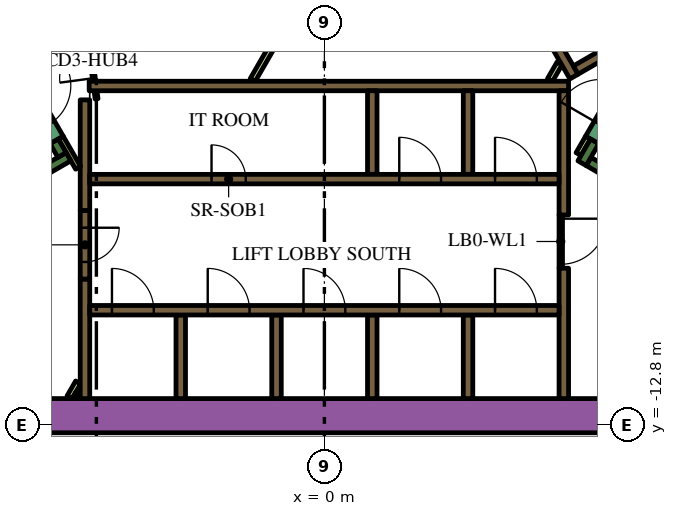
"""IFC4 building model, lengths in metres.
Left out: names, types, materials, properties, quantities, classifications, styles, units other than length and angle.
Written with IfcOpenShell. Run it as: python <this file> out.ifc"""

import sys

from ifc_helpers import new_model, si_unit, direction, frame, frame_2d, origin, place, context, subcontext, project, spatial, polyline, rectangle, outline, extrude, element, fill, save


model = new_model("IFC4")
c1 = context("Model", 3, precision=1e-05, world=origin(), true_north=direction((0.0, 1.0)))
c2 = subcontext(c1, "Body", "Model", "MODEL_VIEW")
j1 = project(units=[si_unit("LENGTHUNIT", "METRE"), si_unit("PLANEANGLEUNIT", "RADIAN")], contexts=[c1])
p1 = place(None, origin())
s1 = spatial("IfcSite", under=j1, at=p1, CompositionType="ELEMENT")
p2 = place(p1, origin())
s2 = spatial("IfcBuilding", under=s1, at=p2, CompositionType="ELEMENT")
p3 = place(p2, frame((0.0, 0.0, 130.5)))
s3 = spatial("IfcBuildingStorey", under=s2, at=p3, CompositionType="ELEMENT", Elevation=130.5)
p4 = place(p3, frame((6.776, 13.364, 0.0), z_axis=(0.0, 0.0, 1.0), x_axis=(0.500004177138, -0.8660229921, 0.0)))
e1 = element("IfcWall", 1, at=p4, inside=s3, PredefinedType="SOLIDWALL", context=c2, shape_type="SweptSolid", body=[
    extrude(rectangle(XDim=20.204, YDim=0.9, at=frame_2d((10.102, 0.0))), origin(), (0.0, 0.0, 1.0), 3.9),
])
p5 = place(p3, frame((-12.019, -12.55, 0.0), z_axis=(0.0, 0.0, 1.0), x_axis=(1.0, 0.0, 0.0)))
e2 = element("IfcWall", 2, at=p5, inside=s3, PredefinedType="SOLIDWALL", context=c2, shape_type="SweptSolid", body=[
    extrude(rectangle(XDim=21.63, YDim=0.9, at=frame_2d((10.815, 0.0))), origin(), (0.0, 0.0, 1.0), 3.9),
])
p6 = place(p3, frame((12.84, -9.261, 0.0), z_axis=(0.0, 0.0, 1.0), x_axis=(-0.866013990052, 0.500019768644, 0.0)))
e3 = element("IfcWall", 3, at=p6, inside=s3, PredefinedType="SOLIDWALL", context=c2, shape_type="SweptSolid", body=[
    extrude(rectangle(XDim=6.8, YDim=0.25, at=frame_2d((3.4, 0.0))), origin(), (0.0, 0.0, 1.0), 3.9),
])
p7 = place(p3, frame((7.113, -5.33, 0.0), z_axis=(0.0, 0.0, 1.0), x_axis=(-0.499965889992, -0.866045096311, 0.0)))
e4 = element("IfcWall", 4, at=p7, inside=s3, PredefinedType="SOLIDWALL", context=c2, shape_type="SweptSolid", body=[
    extrude(rectangle(XDim=0.666, YDim=0.25, at=frame_2d((0.333, 0.0))), origin(), (0.0, 0.0, 1.0), 3.9),
])
p8 = place(p3, frame((-12.84, -9.261, 0.0), z_axis=(0.0, 0.0, 1.0), x_axis=(0.866016039709, 0.500016218704, 0.0)))
e5 = element("IfcWall", 5, at=p8, inside=s3, PredefinedType="SOLIDWALL", context=c2, shape_type="SweptSolid", body=[
    extrude(rectangle(XDim=7.05, YDim=0.25, at=frame_2d((3.525, 0.0))), origin(), (0.0, 0.0, 1.0), 3.9),
])
p9 = place(p3, frame((-6.905, -5.69, 0.0), z_axis=(0.0, 0.0, 1.0), x_axis=(-0.499993700073, 0.866029041019, 0.0)))
e6 = element("IfcWall", 6, at=p9, inside=s3, PredefinedType="SOLIDWALL", context=c2, shape_type="SweptSolid", body=[
    extrude(rectangle(XDim=0.416, YDim=0.25, at=frame_2d((0.208, 0.0))), origin(), (0.0, 0.0, 1.0), 3.9),
])
p10 = place(p3, frame((-3.78, -12.1, 0.0), z_axis=(0.0, 0.0, 1.0), x_axis=(0.0, 1.0, 0.0)))
e7 = element("IfcWall", 7, at=p10, inside=s3, PredefinedType="SOLIDWALL", context=c2, shape_type="SweptSolid", body=[
    extrude(rectangle(XDim=2.2, YDim=0.25, at=frame_2d((1.1, 0.0))), origin(), (0.0, 0.0, 1.0), 3.9),
])
p11 = place(p3, frame((-6.3, -12.1, 0.0), z_axis=(0.0, 0.0, 1.0), x_axis=(0.0, 1.0, 0.0)))
e8 = element("IfcWall", 8, at=p11, inside=s3, PredefinedType="SOLIDWALL", context=c2, shape_type="SweptSolid", body=[
    extrude(rectangle(XDim=3.146, YDim=0.25, at=frame_2d((1.573, 0.0))), origin(), (0.0, 0.0, 1.0), 3.9),
])
p12 = place(p3, frame((-6.3, -4.24, 0.0), z_axis=(0.0, 0.0, 1.0), x_axis=(0.0, -1.0, 0.0)))
e9 = element("IfcWall", 9, at=p12, inside=s3, PredefinedType="SOLIDWALL", context=c2, shape_type="SweptSolid", body=[
    extrude(rectangle(XDim=2.914, YDim=0.25, at=frame_2d((1.457, 0.0))), origin(), (0.0, 0.0, 1.0), 3.9),
])
p13 = place(p3, frame((-6.19, -3.875, 0.0), z_axis=(0.0, 0.0, 1.0), x_axis=(1.0, 0.0, 0.0)))
e10 = element("IfcWall", 10, at=p13, inside=s3, PredefinedType="SOLIDWALL", context=c2, shape_type="SweptSolid", body=[
    extrude(rectangle(XDim=12.615, YDim=0.25, at=frame_2d((6.307, 0.0))), origin(), (0.0, 0.0, 1.0), 3.9),
])
p14 = place(p3, frame((6.3, -8.67, 0.0), z_axis=(0.0, 0.0, 1.0), x_axis=(0.0, -1.0, 0.0)))
e11 = element("IfcWall", 11, at=p14, inside=s3, PredefinedType="SOLIDWALL", context=c2, shape_type="SweptSolid", body=[
    extrude(rectangle(XDim=3.43, YDim=0.25, at=frame_2d((1.715, 0.0))), origin(), (0.0, 0.0, 1.0), 3.9),
])
p15 = place(p3, frame((6.3, -7.268, 0.0), z_axis=(0.0, 0.0, 1.0), x_axis=(0.0, 1.0, 0.0)))
e12 = element("IfcWall", 12, at=p15, inside=s3, PredefinedType="SOLIDWALL", context=c2, shape_type="SweptSolid", body=[
    extrude(rectangle(XDim=3.268, YDim=0.25, at=frame_2d((1.634, 0.0))), origin(), (0.0, 0.0, 1.0), 3.9),
])
for number, where, z_axis, x_axis in (
    (13, (3.78, -4.0, 0.0), (0.0, 0.0, 1.0), (0.0, -1.0, 0.0)),
    (14, (1.26, -4.0, 0.0), (0.0, 0.0, 1.0), (0.0, -1.0, 0.0)),
    (15, (3.78, -12.1, 0.0), (0.0, 0.0, 1.0), (0.0, 1.0, 0.0)),
    (16, (1.26, -12.1, 0.0), (0.0, 0.0, 1.0), (0.0, 1.0, 0.0)),
    (17, (-1.26, -12.1, 0.0), (0.0, 0.0, 1.0), (0.0, 1.0, 0.0)),
):
    element("IfcWall", number, at=place(p3, frame(where, z_axis=z_axis, x_axis=x_axis)), inside=s3, PredefinedType="SOLIDWALL", context=c2, shape_type="SweptSolid", body=[
        extrude(rectangle(XDim=2.2, YDim=0.25, at=frame_2d((1.1, 0.0))), origin(), (0.0, 0.0, 1.0), 3.9),
    ])
p16 = place(p3, origin())
e18 = element("IfcWall", 18, at=p16, inside=s3, PredefinedType="SOLIDWALL", context=c2, shape_type="SweptSolid", body=[
    extrude(outline(polyline([(0.335, 6.925), (0.335, 7.075), (0.335, 7.075), (0.335, 7.075), (0.245, 7.075), (0.035, 7.439), (0.252, 7.564), (0.377, 7.348), (1.512, 5.382), (1.637, 5.165), (2.221, 4.153), (2.771, 3.199), (2.896, 2.983), (3.138, 2.564), (4.031, 1.017), (4.156, 0.801), (5.292, -1.165), (5.417, -1.382), (6.073, -2.519), (6.552, -3.348), (6.677, -3.564), (6.46, -3.689), (0.332, 6.925), (0.335, 6.925), (0.335, 6.925), (0.335, 6.925)])), origin(), (0.0, 0.0, 1.0), 3.9),
])
p17 = place(p3, frame((9.352, -1.875, 0.0), z_axis=(0.0, 0.0, 1.0), x_axis=(-0.866024844342, -0.500000968981, 0.0)))
e19 = element("IfcWall", 19, at=p17, inside=s3, PredefinedType="SOLIDWALL", context=c2, shape_type="SweptSolid", body=[
    extrude(rectangle(XDim=3.162, YDim=0.25, at=frame_2d((1.581, 0.0))), origin(), (0.0, 0.0, 1.0), 3.9),
])
p18 = place(p3, frame((-6.708, -12.068, 0.0), z_axis=(0.0, 0.0, 1.0), x_axis=(0.500000789788, 0.8660249478, 0.0)))
e20 = element("IfcWall", 20, at=p18, inside=s3, PredefinedType="PARTITIONING", context=c2, shape_type="SweptSolid", body=[
    extrude(rectangle(XDim=0.456, YDim=0.15, at=frame_2d((0.228, 0.0))), origin(), (0.0, 0.0, 1.0), 2.6),
])
p19 = place(p3, frame((-6.534, -12.068, 0.0), z_axis=(0.0, 0.0, 1.0), x_axis=(0.500240224089, 0.865886665912, 0.0)))
e21 = element("IfcWall", 21, at=p19, inside=s3, PredefinedType="PARTITIONING", context=c2, shape_type="SweptSolid", body=[
    extrude(rectangle(XDim=0.109, YDim=0.15, at=frame_2d((0.054, 0.0))), origin(), (0.0, 0.0, 1.0), 2.6),
])
p20 = place(p3, frame((-6.48, -6.027, 0.0), z_axis=(0.0, 0.0, 1.0), x_axis=(-0.499936960004, 0.866061796884, 0.0)))
e22 = element("IfcWall", 22, at=p20, inside=s3, PredefinedType="PARTITIONING", context=c2, shape_type="SweptSolid", body=[
    extrude(rectangle(XDim=0.919, YDim=0.15, at=frame_2d((0.46, 0.0))), origin(), (0.0, 0.0, 1.0), 3.9),
])
p21 = place(p3, frame((-1.887, -3.718, 0.0), z_axis=(0.0, 0.0, 1.0), x_axis=(0.499842898591, 0.866116087328, 0.0)))
e23 = element("IfcWall", 23, at=p21, inside=s3, PredefinedType="PARTITIONING", context=c2, shape_type="SweptSolid", body=[
    extrude(rectangle(XDim=0.936, YDim=0.15, at=frame_2d((0.468, 0.0))), origin(), (0.0, 0.0, 1.0), 2.6),
])
p22 = place(p3, frame((6.688, -5.667, 0.0), z_axis=(0.0, 0.0, 1.0), x_axis=(0.499834152157, 0.86612113491, 0.0)))
e24 = element("IfcWall", 24, at=p22, inside=s3, PredefinedType="PARTITIONING", context=c2, shape_type="SweptSolid", body=[
    extrude(rectangle(XDim=0.505, YDim=0.15, at=frame_2d((0.252, 0.0))), origin(), (0.0, 0.0, 1.0), 2.6),
])
p23 = place(p3, frame((5.936, -3.718, 0.0), z_axis=(0.0, 0.0, 1.0), x_axis=(0.499890179513, 0.866088799389, 0.0)))
e25 = element("IfcWall", 25, at=p23, inside=s3, PredefinedType="PARTITIONING", context=c2, shape_type="SweptSolid", body=[
    extrude(rectangle(XDim=0.504, YDim=0.15, at=frame_2d((0.252, 0.0))), origin(), (0.0, 0.0, 1.0), 2.6),
])
p24 = place(p3, frame((-6.175, -9.775, 0.0), z_axis=(0.0, 0.0, 1.0), x_axis=(1.0, 0.0, 0.0)))
e26 = element("IfcWall", 26, at=p24, inside=s3, PredefinedType="SOLIDWALL", context=c2, shape_type="SweptSolid", body=[
    extrude(rectangle(XDim=12.35, YDim=0.25, at=frame_2d((6.175, 0.0))), origin(), (0.0, 0.0, 1.0), 3.9),
])
p25 = place(p24, frame((0.585, 0.0, 0.0)))
e27 = element("IfcOpeningElement", 27, at=p25, cuts=e26, PredefinedType="OPENING", context=c2, shape_type="SweptSolid", body=[
    extrude(rectangle(XDim=1.1, YDim=2.1, at=frame_2d((0.55, 1.05))), frame((0.0, 0.135, 0.0), z_axis=(0.0, -1.0, 0.0), x_axis=(1.0, 0.0, 0.0)), (0.0, 0.0, 1.0), 0.27),
])
p26 = place(p24, frame((3.105, 0.0, 0.0)))
e28 = element("IfcOpeningElement", 28, at=p26, cuts=e26, PredefinedType="OPENING", context=c2, shape_type="SweptSolid", body=[
    extrude(rectangle(XDim=1.1, YDim=2.1, at=frame_2d((0.55, 1.05))), frame((0.0, 0.135, 0.0), z_axis=(0.0, -1.0, 0.0), x_axis=(1.0, 0.0, 0.0)), (0.0, 0.0, 1.0), 0.27),
])
p27 = place(p24, frame((5.625, 0.0, 0.0)))
e29 = element("IfcOpeningElement", 29, at=p27, cuts=e26, PredefinedType="OPENING", context=c2, shape_type="SweptSolid", body=[
    extrude(rectangle(XDim=1.1, YDim=2.1, at=frame_2d((0.55, 1.05))), frame((0.0, 0.135, 0.0), z_axis=(0.0, -1.0, 0.0), x_axis=(1.0, 0.0, 0.0)), (0.0, 0.0, 1.0), 0.27),
])
p28 = place(p24, frame((8.145, 0.0, 0.0)))
e30 = element("IfcOpeningElement", 30, at=p28, cuts=e26, PredefinedType="OPENING", context=c2, shape_type="SweptSolid", body=[
    extrude(rectangle(XDim=1.1, YDim=2.1, at=frame_2d((0.55, 1.05))), frame((0.0, 0.135, 0.0), z_axis=(0.0, -1.0, 0.0), x_axis=(1.0, 0.0, 0.0)), (0.0, 0.0, 1.0), 0.27),
])
p29 = place(p24, frame((10.665, 0.0, 0.0)))
e31 = element("IfcOpeningElement", 31, at=p29, cuts=e26, PredefinedType="OPENING", context=c2, shape_type="SweptSolid", body=[
    extrude(rectangle(XDim=1.1, YDim=2.1, at=frame_2d((0.55, 1.05))), frame((0.0, 0.135, 0.0), z_axis=(0.0, -1.0, 0.0), x_axis=(1.0, 0.0, 0.0)), (0.0, 0.0, 1.0), 0.27),
])
p30 = place(p3, frame((-6.175, -6.325, 0.0), z_axis=(0.0, 0.0, 1.0), x_axis=(1.0, 0.0, 0.0)))
e32 = element("IfcWall", 32, at=p30, inside=s3, PredefinedType="SOLIDWALL", context=c2, shape_type="SweptSolid", body=[
    extrude(rectangle(XDim=12.35, YDim=0.25, at=frame_2d((6.175, 0.0))), origin(), (0.0, 0.0, 1.0), 3.9),
])
p31 = place(p30, frame((3.205, 0.0, 0.0)))
e33 = element("IfcOpeningElement", 33, at=p31, cuts=e32, PredefinedType="OPENING", context=c2, shape_type="SweptSolid", body=[
    extrude(rectangle(XDim=0.9, YDim=2.1, at=frame_2d((0.45, 1.05))), frame((0.0, 0.135, 0.0), z_axis=(0.0, -1.0, 0.0), x_axis=(1.0, 0.0, 0.0)), (0.0, 0.0, 1.0), 0.27),
])
p32 = place(p30, frame((8.145, 0.0, 0.0)))
e34 = element("IfcOpeningElement", 34, at=p32, cuts=e32, PredefinedType="OPENING", context=c2, shape_type="SweptSolid", body=[
    extrude(rectangle(XDim=1.1, YDim=2.1, at=frame_2d((0.55, 1.05))), frame((0.0, 0.135, 0.0), z_axis=(0.0, -1.0, 0.0), x_axis=(1.0, 0.0, 0.0)), (0.0, 0.0, 1.0), 0.27),
])
p33 = place(p30, frame((10.665, 0.0, 0.0)))
e35 = element("IfcOpeningElement", 35, at=p33, cuts=e32, PredefinedType="OPENING", context=c2, shape_type="SweptSolid", body=[
    extrude(rectangle(XDim=1.1, YDim=2.1, at=frame_2d((0.55, 1.05))), frame((0.0, 0.135, 0.0), z_axis=(0.0, -1.0, 0.0), x_axis=(1.0, 0.0, 0.0)), (0.0, 0.0, 1.0), 0.27),
])
p34 = place(p3, frame((7.048, -5.292, 0.0), z_axis=(0.0, 0.0, 1.0), x_axis=(0.49994051562, 0.866059744384, 0.0)))
e36 = element("IfcWall", 36, at=p34, inside=s3, PredefinedType="SOLIDWALL", context=c2, shape_type="SweptSolid", body=[
    extrude(rectangle(XDim=2.1, YDim=0.4, at=frame_2d((1.05, 0.0))), origin(), (0.0, 0.0, 1.0), 3.9),
])
p35 = place(p34, frame((0.45, 0.0, 0.0)))
e37 = element("IfcOpeningElement", 37, at=p35, cuts=e36, PredefinedType="OPENING", context=c2, shape_type="SweptSolid", body=[
    extrude(rectangle(XDim=1.2, YDim=2.1, at=frame_2d((0.6, 1.05))), frame((0.0, 0.21, 0.0), z_axis=(0.0, -1.0, 0.0), x_axis=(1.0, 0.0, 0.0)), (0.0, 0.0, 1.0), 0.42),
])
p36 = place(p3, frame((-8.098, -3.474, 0.0), z_axis=(0.0, 0.0, 1.0), x_axis=(0.49994051562, -0.866059744384, 0.0)))
e38 = element("IfcWall", 38, at=p36, inside=s3, PredefinedType="SOLIDWALL", context=c2, shape_type="SweptSolid", body=[
    extrude(rectangle(XDim=2.1, YDim=0.4, at=frame_2d((1.05, 0.0))), origin(), (0.0, 0.0, 1.0), 3.9),
])
p37 = place(p36, frame((0.45, 0.0, 0.0)))
e39 = element("IfcOpeningElement", 39, at=p37, cuts=e38, PredefinedType="OPENING", context=c2, shape_type="SweptSolid", body=[
    extrude(rectangle(XDim=1.2, YDim=2.1, at=frame_2d((0.6, 1.05))), frame((0.0, 0.21, 0.0), z_axis=(0.0, -1.0, 0.0), x_axis=(1.0, 0.0, 0.0)), (0.0, 0.0, 1.0), 0.42),
])
p38 = place(p3, frame((-6.3, -7.154, 0.0), z_axis=(0.0, 0.0, 1.0), x_axis=(0.0, -1.0, 0.0)))
e40 = element("IfcWall", 40, at=p38, inside=s3, PredefinedType="SOLIDWALL", context=c2, shape_type="SweptSolid", body=[
    extrude(rectangle(XDim=1.8, YDim=0.25, at=frame_2d((0.9, 0.0))), origin(), (0.0, 0.0, 1.0), 3.9),
])
p39 = place(p38, frame((0.45, 0.0, 0.0)))
e41 = element("IfcOpeningElement", 41, at=p39, cuts=e40, PredefinedType="OPENING", context=c2, shape_type="SweptSolid", body=[
    extrude(rectangle(XDim=0.9, YDim=2.1, at=frame_2d((0.45, 1.05))), frame((0.0, 0.135, 0.0), z_axis=(0.0, -1.0, 0.0), x_axis=(1.0, 0.0, 0.0)), (0.0, 0.0, 1.0), 0.27),
])
p40 = place(p3, frame((-5.995, -4.213, 0.0), z_axis=(0.0, 0.0, 1.0), x_axis=(-0.132072335448, 0.991240081014, 0.0)))
e42 = element("IfcWall", 42, at=p40, inside=s3, PredefinedType="PARTITIONING", context=c2, shape_type="SweptSolid", body=[
    extrude(rectangle(XDim=2.1, YDim=0.076, at=frame_2d((1.05, 0.0))), origin(), (0.0, 0.0, 1.0), 2.6),
])
p41 = place(p40, frame((0.55, 0.0, 0.0)))
e43 = element("IfcOpeningElement", 43, at=p41, cuts=e42, PredefinedType="OPENING", context=c2, shape_type="SweptSolid", body=[
    extrude(rectangle(XDim=0.9, YDim=2.1, at=frame_2d((0.45, 1.05))), frame((0.0, 0.048, 0.0), z_axis=(0.0, -1.0, 0.0), x_axis=(1.0, 0.0, 0.0)), (0.0, 0.0, 1.0), 0.096),
])
p42 = place(p3, frame((6.22, -7.266, 0.0), z_axis=(0.0, 0.0, 1.0), x_axis=(0.0, -1.0, 0.0)))
e44 = element("IfcWall", 44, at=p42, inside=s3, PredefinedType="PARTITIONING", context=c2, shape_type="SweptSolid", body=[
    extrude(rectangle(XDim=1.4, YDim=0.09, at=frame_2d((0.7, 0.0))), origin(), (0.0, 0.0, 1.0), 2.6),
])
p43 = place(p42, frame((0.1, 0.0, 0.0)))
e45 = element("IfcOpeningElement", 45, at=p43, cuts=e44, PredefinedType="OPENING", context=c2, shape_type="SweptSolid", body=[
    extrude(rectangle(XDim=1.2, YDim=2.1, at=frame_2d((0.6, 1.05))), frame((0.0, 0.055, 0.0), z_axis=(0.0, -1.0, 0.0), x_axis=(1.0, 0.0, 0.0)), (0.0, 0.0, 1.0), 0.11),
])
p44 = place(p3, frame((6.163, 18.475, 0.0), z_axis=(0.0, 0.0, 1.0), x_axis=(0.500001317485, -0.866024643133, 0.0)))
e46 = element("IfcWall", 46, at=p44, inside=s3, PredefinedType="PARTITIONING", context=c2, shape_type="SweptSolid", body=[
    extrude(rectangle(XDim=25.767, YDim=0.15, at=frame_2d((12.883, 0.0))), origin(), (0.0, 0.0, 1.0), 2.6),
])
p45 = place(p44, frame((21.774, 0.0, 0.0)))
e47 = element("IfcOpeningElement", 47, at=p45, cuts=e46, PredefinedType="OPENING", context=c2, shape_type="SweptSolid", body=[
    extrude(rectangle(XDim=1.0, YDim=2.1, at=frame_2d((0.5, 1.05))), frame((0.0, 0.085, 0.0), z_axis=(0.0, -1.0, 0.0), x_axis=(1.0, 0.0, 0.0)), (0.0, 0.0, 1.0), 0.17),
])
p46 = place(p44, frame((15.571, 0.0, 0.0)))
e48 = element("IfcOpeningElement", 48, at=p46, cuts=e46, PredefinedType="OPENING", context=c2, shape_type="SweptSolid", body=[
    extrude(rectangle(XDim=1.0, YDim=2.1, at=frame_2d((0.5, 1.05))), frame((0.0, 0.085, 0.0), z_axis=(0.0, -1.0, 0.0), x_axis=(1.0, 0.0, 0.0)), (0.0, 0.0, 1.0), 0.17),
])
p47 = place(p44, frame((9.265, 0.0, 0.0)))
e49 = element("IfcOpeningElement", 49, at=p47, cuts=e46, PredefinedType="OPENING", context=c2, shape_type="SweptSolid", body=[
    extrude(rectangle(XDim=1.0, YDim=2.1, at=frame_2d((0.5, 1.05))), frame((0.0, 0.085, 0.0), z_axis=(0.0, -1.0, 0.0), x_axis=(1.0, 0.0, 0.0)), (0.0, 0.0, 1.0), 0.17),
])
p48 = place(p44, frame((3.063, 0.0, 0.0)))
e50 = element("IfcOpeningElement", 50, at=p48, cuts=e46, PredefinedType="OPENING", context=c2, shape_type="SweptSolid", body=[
    extrude(rectangle(XDim=1.0, YDim=2.1, at=frame_2d((0.5, 1.05))), frame((0.0, 0.085, 0.0), z_axis=(0.0, -1.0, 0.0), x_axis=(1.0, 0.0, 0.0)), (0.0, 0.0, 1.0), 0.17),
])
p49 = place(p3, frame((-19.081, -3.9, 0.0), z_axis=(0.0, 0.0, 1.0), x_axis=(0.499998313975, 0.866026377209, 0.0)))
e51 = element("IfcWall", 51, at=p49, inside=s3, PredefinedType="PARTITIONING", context=c2, shape_type="SweptSolid", body=[
    extrude(rectangle(XDim=25.766, YDim=0.15, at=frame_2d((12.883, 0.0))), origin(), (0.0, 0.0, 1.0), 2.6),
])
p50 = place(p49, frame((24.141, 0.0, 0.0)))
e52 = element("IfcOpeningElement", 52, at=p50, cuts=e51, PredefinedType="OPENING", context=c2, shape_type="SweptSolid", body=[
    extrude(rectangle(XDim=1.1, YDim=2.1, at=frame_2d((0.55, 1.05))), frame((0.0, 0.085, 0.0), z_axis=(0.0, -1.0, 0.0), x_axis=(1.0, 0.0, 0.0)), (0.0, 0.0, 1.0), 0.17),
])
p51 = place(p49, frame((13.144, 0.0, 0.0)))
e53 = element("IfcOpeningElement", 53, at=p51, cuts=e51, PredefinedType="OPENING", context=c2, shape_type="SweptSolid", body=[
    extrude(rectangle(XDim=1.0, YDim=2.1, at=frame_2d((0.5, 1.05))), frame((0.0, 0.085, 0.0), z_axis=(0.0, -1.0, 0.0), x_axis=(1.0, 0.0, 0.0)), (0.0, 0.0, 1.0), 0.17),
])
p52 = place(p49, frame((11.593, 0.0, 0.0)))
e54 = element("IfcOpeningElement", 54, at=p52, cuts=e51, PredefinedType="OPENING", context=c2, shape_type="SweptSolid", body=[
    extrude(rectangle(XDim=1.1, YDim=2.1, at=frame_2d((0.55, 1.05))), frame((0.0, 0.085, 0.0), z_axis=(0.0, -1.0, 0.0), x_axis=(1.0, 0.0, 0.0)), (0.0, 0.0, 1.0), 0.17),
])
p53 = place(p49, frame((0.596, 0.0, 0.0)))
e55 = element("IfcOpeningElement", 55, at=p53, cuts=e51, PredefinedType="OPENING", context=c2, shape_type="SweptSolid", body=[
    extrude(rectangle(XDim=1.0, YDim=2.1, at=frame_2d((0.5, 1.05))), frame((0.0, 0.085, 0.0), z_axis=(0.0, -1.0, 0.0), x_axis=(1.0, 0.0, 0.0)), (0.0, 0.0, 1.0), 0.17),
])
p54 = place(p25, origin())
e56 = element("IfcDoor", 56, at=p54, inside=s3, OperationType="DOUBLE_DOOR_SLIDING", PredefinedType="DOOR", context=c2, shape_type="SweptSolid", body=[
    extrude(rectangle(XDim=1.1, YDim=2.1, at=frame_2d((0.55, 1.05))), frame((0.0, 0.025, 0.0), z_axis=(0.0, -1.0, 0.0), x_axis=(1.0, 0.0, 0.0)), (0.0, 0.0, 1.0), 0.05),
])
fill(e27, e56)
p55 = place(p26, origin())
e57 = element("IfcDoor", 57, at=p55, inside=s3, OperationType="DOUBLE_DOOR_SLIDING", PredefinedType="DOOR", context=c2, shape_type="SweptSolid", body=[
    extrude(rectangle(XDim=1.1, YDim=2.1, at=frame_2d((0.55, 1.05))), frame((0.0, 0.025, 0.0), z_axis=(0.0, -1.0, 0.0), x_axis=(1.0, 0.0, 0.0)), (0.0, 0.0, 1.0), 0.05),
])
fill(e28, e57)
p56 = place(p27, origin())
e58 = element("IfcDoor", 58, at=p56, inside=s3, OperationType="DOUBLE_DOOR_SLIDING", PredefinedType="DOOR", context=c2, shape_type="SweptSolid", body=[
    extrude(rectangle(XDim=1.1, YDim=2.1, at=frame_2d((0.55, 1.05))), frame((0.0, 0.025, 0.0), z_axis=(0.0, -1.0, 0.0), x_axis=(1.0, 0.0, 0.0)), (0.0, 0.0, 1.0), 0.05),
])
fill(e29, e58)
p57 = place(p28, origin())
e59 = element("IfcDoor", 59, at=p57, inside=s3, OperationType="DOUBLE_DOOR_SLIDING", PredefinedType="DOOR", context=c2, shape_type="SweptSolid", body=[
    extrude(rectangle(XDim=1.1, YDim=2.1, at=frame_2d((0.55, 1.05))), frame((0.0, 0.025, 0.0), z_axis=(0.0, -1.0, 0.0), x_axis=(1.0, 0.0, 0.0)), (0.0, 0.0, 1.0), 0.05),
])
fill(e30, e59)
p58 = place(p29, origin())
e60 = element("IfcDoor", 60, at=p58, inside=s3, OperationType="DOUBLE_DOOR_SLIDING", PredefinedType="DOOR", context=c2, shape_type="SweptSolid", body=[
    extrude(rectangle(XDim=1.1, YDim=2.1, at=frame_2d((0.55, 1.05))), frame((0.0, 0.025, 0.0), z_axis=(0.0, -1.0, 0.0), x_axis=(1.0, 0.0, 0.0)), (0.0, 0.0, 1.0), 0.05),
])
fill(e31, e60)
p59 = place(p31, origin())
e61 = element("IfcDoor", 61, at=p59, inside=s3, OperationType="SINGLE_SWING_LEFT", PredefinedType="DOOR", context=c2, shape_type="SweptSolid", body=[
    extrude(rectangle(XDim=0.9, YDim=2.1, at=frame_2d((0.45, 1.05))), frame((0.0, 0.025, 0.0), z_axis=(0.0, -1.0, 0.0), x_axis=(1.0, 0.0, 0.0)), (0.0, 0.0, 1.0), 0.05),
])
fill(e33, e61)
p60 = place(p32, origin())
e62 = element("IfcDoor", 62, at=p60, inside=s3, OperationType="DOUBLE_DOOR_SLIDING", PredefinedType="DOOR", context=c2, shape_type="SweptSolid", body=[
    extrude(rectangle(XDim=1.1, YDim=2.1, at=frame_2d((0.55, 1.05))), frame((0.0, 0.025, 0.0), z_axis=(0.0, -1.0, 0.0), x_axis=(1.0, 0.0, 0.0)), (0.0, 0.0, 1.0), 0.05),
])
fill(e34, e62)
p61 = place(p33, origin())
e63 = element("IfcDoor", 63, at=p61, inside=s3, OperationType="DOUBLE_DOOR_SLIDING", PredefinedType="DOOR", context=c2, shape_type="SweptSolid", body=[
    extrude(rectangle(XDim=1.1, YDim=2.1, at=frame_2d((0.55, 1.05))), frame((0.0, 0.025, 0.0), z_axis=(0.0, -1.0, 0.0), x_axis=(1.0, 0.0, 0.0)), (0.0, 0.0, 1.0), 0.05),
])
fill(e35, e63)
p62 = place(p39, origin())
e64 = element("IfcDoor", 64, at=p62, inside=s3, OperationType="SINGLE_SWING_LEFT", PredefinedType="DOOR", context=c2, shape_type="SweptSolid", body=[
    extrude(rectangle(XDim=0.9, YDim=2.1, at=frame_2d((0.45, 1.05))), frame((0.0, 0.025, 0.0), z_axis=(0.0, -1.0, 0.0), x_axis=(1.0, 0.0, 0.0)), (0.0, 0.0, 1.0), 0.05),
])
fill(e41, e64)
p63 = place(p41, origin())
e65 = element("IfcDoor", 65, at=p63, inside=s3, OperationType="SINGLE_SWING_LEFT", PredefinedType="DOOR", context=c2, shape_type="SweptSolid", body=[
    extrude(rectangle(XDim=0.9, YDim=2.1, at=frame_2d((0.45, 1.05))), frame((0.0, 0.025, 0.0), z_axis=(0.0, -1.0, 0.0), x_axis=(1.0, 0.0, 0.0)), (0.0, 0.0, 1.0), 0.05),
])
fill(e43, e65)
p64 = place(p43, origin())
e66 = element("IfcDoor", 66, at=p64, inside=s3, OperationType="SINGLE_SWING_LEFT", PredefinedType="DOOR", context=c2, shape_type="SweptSolid", body=[
    extrude(rectangle(XDim=1.2, YDim=2.1, at=frame_2d((0.6, 1.05))), frame((0.0, 0.025, 0.0), z_axis=(0.0, -1.0, 0.0), x_axis=(1.0, 0.0, 0.0)), (0.0, 0.0, 1.0), 0.05),
])
fill(e45, e66)
save(model, sys.argv[1])
